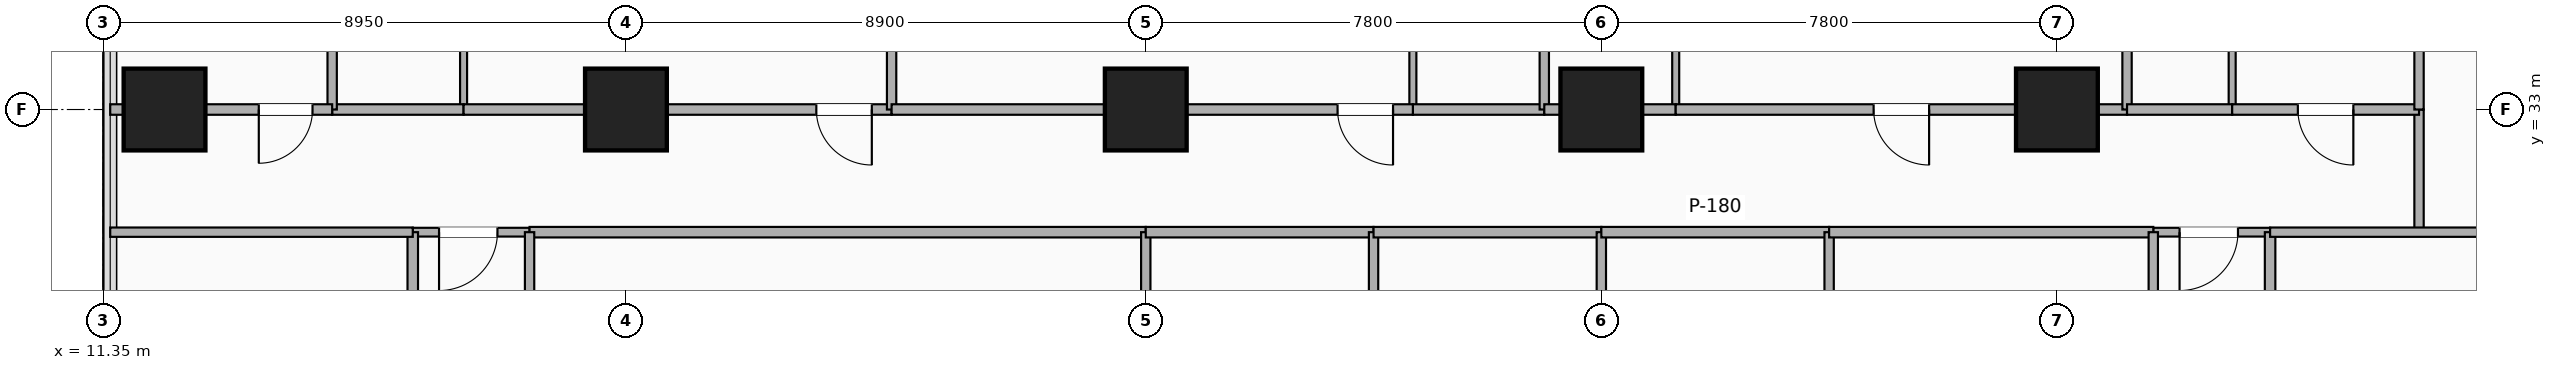
"""IFC4 building model, lengths in metres.
Left out: names, types, materials, properties, quantities, classifications, styles, units other than length and angle.
Written with IfcOpenShell. Run it as: python <this file> out.ifc"""

import sys

from ifc_helpers import new_model, si_unit, direction, frame, frame_2d, origin, origin_2d, place, context, subcontext, project, spatial, rectangle, extrude, element, fill, save


model = new_model("IFC4")
c1 = context("Model", 3, precision=1e-05, world=origin(), true_north=direction((0.0, 1.0)))
c2 = subcontext(c1, "Body", "Model", "MODEL_VIEW")
j1 = project(units=[si_unit("LENGTHUNIT", "METRE"), si_unit("PLANEANGLEUNIT", "RADIAN")], contexts=[c1])
p1 = place(None, origin())
s1 = spatial("IfcSite", under=j1, at=p1, CompositionType="ELEMENT")
p2 = place(p1, origin())
s2 = spatial("IfcBuilding", under=s1, at=p2, CompositionType="ELEMENT")
p3 = place(p2, frame((0.0, 0.0, 50.9)))
s3 = spatial("IfcBuildingStorey", under=s2, at=p3, CompositionType="ELEMENT", Elevation=50.9)
for number, where, z_axis, x_axis in (
    (1, (20.3, 33.0, -0.28), (0.0, 0.0, 1.0), (1.0, 0.0, 0.0)),
    (2, (29.2, 33.0, -0.28), (0.0, 0.0, 1.0), (1.0, 0.0, 0.0)),
    (3, (37.0, 33.0, -0.28), (0.0, 0.0, 1.0), (1.0, 0.0, 0.0)),
    (4, (44.8, 33.0, -0.28), (0.0, 0.0, 1.0), (1.0, 0.0, 0.0)),
    (5, (12.4, 33.0, -0.28), (0.0, 0.0, 1.0), (1.0, 0.0, 0.0)),
):
    element("IfcColumn", number, at=place(p3, frame(where, z_axis=z_axis, x_axis=x_axis)), inside=s3, PredefinedType="COLUMN", context=c2, shape_type="SweptSolid", body=[
        extrude(rectangle(XDim=1.4, YDim=1.4, at=origin_2d()), origin(), (0.0, 0.0, 1.0), 3.5),
    ])
p4 = place(p3, frame((16.65, 30.9, 0.0), z_axis=(0.0, 0.0, 1.0), x_axis=(1.0, 0.0, 0.0)))
e6 = element("IfcWall", 6, at=p4, inside=s3, PredefinedType="PARTITIONING", context=c2, shape_type="SweptSolid", body=[
    extrude(rectangle(XDim=2.0, YDim=0.15, at=frame_2d((1.0, 0.0))), origin(), (0.0, 0.0, 1.0), 3.22),
])
p5 = place(p4, frame((0.45, 0.0, 0.0)))
e7 = element("IfcOpeningElement", 7, at=p5, cuts=e6, PredefinedType="OPENING", context=c2, shape_type="SweptSolid", body=[
    extrude(rectangle(XDim=1.0, YDim=2.15, at=frame_2d((0.5, 1.075))), frame((0.0, 0.085, 0.0), z_axis=(0.0, -1.0, 0.0), x_axis=(1.0, 0.0, 0.0)), (0.0, 0.0, 1.0), 0.17),
])
p6 = place(p3, frame((46.45, 30.9, 0.0), z_axis=(0.0, 0.0, 1.0), x_axis=(1.0, 0.0, 0.0)))
e8 = element("IfcWall", 8, at=p6, inside=s3, PredefinedType="PARTITIONING", context=c2, shape_type="SweptSolid", body=[
    extrude(rectangle(XDim=2.0, YDim=0.15, at=frame_2d((1.0, 0.0))), origin(), (0.0, 0.0, 1.0), 3.22),
])
p7 = place(p6, frame((0.45, 0.0, 0.0)))
e9 = element("IfcOpeningElement", 9, at=p7, cuts=e8, PredefinedType="OPENING", context=c2, shape_type="SweptSolid", body=[
    extrude(rectangle(XDim=1.0, YDim=2.15, at=frame_2d((0.5, 1.075))), frame((0.0, 0.085, 0.0), z_axis=(0.0, -1.0, 0.0), x_axis=(1.0, 0.0, 0.0)), (0.0, 0.0, 1.0), 0.17),
])
p8 = place(p3, frame((51.0, 30.9, 0.0), z_axis=(0.0, 0.0, 1.0), x_axis=(0.0, 1.0, 0.0)))
e10 = element("IfcWall", 10, at=p8, inside=s3, PredefinedType="PARTITIONING", context=c2, shape_type="SweptSolid", body=[
    extrude(rectangle(XDim=2.1, YDim=0.16, at=frame_2d((1.05, 0.0))), origin(), (0.0, 0.0, 1.0), 2.51),
])
p9 = place(p3, frame((18.65, 30.9, 0.0), z_axis=(0.0, 0.0, 1.0), x_axis=(1.0, 0.0, 0.0)))
e11 = element("IfcWall", 11, at=p9, inside=s3, PredefinedType="PARTITIONING", context=c2, shape_type="SweptSolid", body=[
    extrude(rectangle(XDim=10.55, YDim=0.18, at=frame_2d((5.275, 0.0))), origin(), (0.0, 0.0, 1.0), 2.51),
])
p10 = place(p3, frame((18.65, 22.65, 0.0), z_axis=(0.0, 0.0, 1.0), x_axis=(0.0, 1.0, 0.0)))
e12 = element("IfcWall", 12, at=p10, inside=s3, PredefinedType="PARTITIONING", context=c2, shape_type="SweptSolid", body=[
    extrude(rectangle(XDim=8.25, YDim=0.16, at=frame_2d((4.125, 0.0))), origin(), (0.0, 0.0, 1.0), 2.788),
])
p11 = place(p3, frame((29.2, 22.65, 0.0), z_axis=(0.0, 0.0, 1.0), x_axis=(0.0, 1.0, 0.0)))
e13 = element("IfcWall", 13, at=p11, inside=s3, PredefinedType="PARTITIONING", context=c2, shape_type="SweptSolid", body=[
    extrude(rectangle(XDim=8.25, YDim=0.16, at=frame_2d((4.125, 0.0))), origin(), (0.0, 0.0, 1.0), 2.51),
])
p12 = place(p3, frame((29.2, 30.9, 0.0), z_axis=(0.0, 0.0, 1.0), x_axis=(1.0, 0.0, 0.0)))
e14 = element("IfcWall", 14, at=p12, inside=s3, PredefinedType="PARTITIONING", context=c2, shape_type="SweptSolid", body=[
    extrude(rectangle(XDim=3.9, YDim=0.18, at=frame_2d((1.95, 0.0))), origin(), (0.0, 0.0, 1.0), 2.51),
])
p13 = place(p3, frame((33.1, 22.65, 0.0), z_axis=(0.0, 0.0, 1.0), x_axis=(0.0, 1.0, 0.0)))
e15 = element("IfcWall", 15, at=p13, inside=s3, PredefinedType="PARTITIONING", context=c2, shape_type="SweptSolid", body=[
    extrude(rectangle(XDim=8.25, YDim=0.16, at=frame_2d((4.125, 0.0))), origin(), (0.0, 0.0, 1.0), 2.788),
])
p14 = place(p3, frame((33.1, 30.9, 0.0), z_axis=(0.0, 0.0, 1.0), x_axis=(1.0, 0.0, 0.0)))
e16 = element("IfcWall", 16, at=p14, inside=s3, PredefinedType="PARTITIONING", context=c2, shape_type="SweptSolid", body=[
    extrude(rectangle(XDim=3.9, YDim=0.18, at=frame_2d((1.95, 0.0))), origin(), (0.0, 0.0, 1.0), 2.51),
])
p15 = place(p3, frame((37.0, 22.65, 0.0), z_axis=(0.0, 0.0, 1.0), x_axis=(0.0, 1.0, 0.0)))
e17 = element("IfcWall", 17, at=p15, inside=s3, PredefinedType="PARTITIONING", context=c2, shape_type="SweptSolid", body=[
    extrude(rectangle(XDim=8.25, YDim=0.16, at=frame_2d((4.125, 0.0))), origin(), (0.0, 0.0, 1.0), 2.51),
])
p16 = place(p3, frame((37.0, 30.9, 0.0), z_axis=(0.0, 0.0, 1.0), x_axis=(1.0, 0.0, 0.0)))
e18 = element("IfcWall", 18, at=p16, inside=s3, PredefinedType="PARTITIONING", context=c2, shape_type="SweptSolid", body=[
    extrude(rectangle(XDim=3.9, YDim=0.18, at=frame_2d((1.95, 0.0))), origin(), (0.0, 0.0, 1.0), 2.51),
])
p17 = place(p3, frame((40.9, 22.65, 0.0), z_axis=(0.0, 0.0, 1.0), x_axis=(0.0, 1.0, 0.0)))
e19 = element("IfcWall", 19, at=p17, inside=s3, PredefinedType="PARTITIONING", context=c2, shape_type="SweptSolid", body=[
    extrude(rectangle(XDim=8.25, YDim=0.16, at=frame_2d((4.125, 0.0))), origin(), (0.0, 0.0, 1.0), 2.788),
])
p18 = place(p3, frame((40.9, 30.9, 0.0), z_axis=(0.0, 0.0, 1.0), x_axis=(1.0, 0.0, 0.0)))
e20 = element("IfcWall", 20, at=p18, inside=s3, PredefinedType="PARTITIONING", context=c2, shape_type="SweptSolid", body=[
    extrude(rectangle(XDim=5.55, YDim=0.18, at=frame_2d((2.775, 0.0))), origin(), (0.0, 0.0, 1.0), 2.51),
])
p19 = place(p3, frame((46.45, 22.65, 0.0), z_axis=(0.0, 0.0, 1.0), x_axis=(0.0, 1.0, 0.0)))
e21 = element("IfcWall", 21, at=p19, inside=s3, PredefinedType="PARTITIONING", context=c2, shape_type="SweptSolid", body=[
    extrude(rectangle(XDim=8.25, YDim=0.16, at=frame_2d((4.125, 0.0))), origin(), (0.0, 0.0, 1.0), 2.788),
])
p20 = place(p3, frame((17.52, 33.0, 0.0), z_axis=(0.0, 0.0, 1.0), x_axis=(0.0, 1.0, 0.0)))
e22 = element("IfcWall", 22, at=p20, inside=s3, PredefinedType="PARTITIONING", context=c2, shape_type="SweptSolid", body=[
    extrude(rectangle(XDim=2.35, YDim=0.12, at=frame_2d((1.175, 0.0))), origin(), (0.0, 0.0, 1.0), 2.51),
])
p21 = place(p3, frame((15.27, 33.0, 0.0), z_axis=(0.0, 0.0, 1.0), x_axis=(1.0, 0.0, 0.0)))
e23 = element("IfcWall", 23, at=p21, inside=s3, PredefinedType="PARTITIONING", context=c2, shape_type="SweptSolid", body=[
    extrude(rectangle(XDim=2.25, YDim=0.18, at=frame_2d((1.125, 0.0))), origin(), (0.0, 0.0, 1.0), 2.51),
])
p22 = place(p3, frame((17.52, 33.0, 0.0), z_axis=(0.0, 0.0, 1.0), x_axis=(1.0, 0.0, 0.0)))
e24 = element("IfcWall", 24, at=p22, inside=s3, PredefinedType="PARTITIONING", context=c2, shape_type="SweptSolid", body=[
    extrude(rectangle(XDim=7.328, YDim=0.18, at=frame_2d((3.664, 0.0))), origin(), (0.0, 0.0, 1.0), 2.51),
])
p23 = place(p22, frame((6.04, 0.0, 0.0)))
e25 = element("IfcOpeningElement", 25, at=p23, cuts=e24, PredefinedType="OPENING", context=c2, shape_type="SweptSolid", body=[
    extrude(rectangle(XDim=0.95, YDim=2.15, at=frame_2d((0.475, 1.075))), frame((0.0, 0.1, 0.0), z_axis=(0.0, -1.0, 0.0), x_axis=(1.0, 0.0, 0.0)), (0.0, 0.0, 1.0), 0.2),
])
p24 = place(p3, frame((15.27, 33.0, 0.0), z_axis=(0.0, 0.0, 1.0), x_axis=(0.0, 1.0, 0.0)))
e26 = element("IfcWall", 26, at=p24, inside=s3, PredefinedType="PARTITIONING", context=c2, shape_type="SweptSolid", body=[
    extrude(rectangle(XDim=11.58, YDim=0.16, at=frame_2d((5.79, 0.0))), origin(), (0.0, 0.0, 1.0), 2.51),
])
p25 = place(p3, frame((24.848, 33.0, 0.0), z_axis=(0.0, 0.0, 1.0), x_axis=(0.0, 1.0, 0.0)))
e27 = element("IfcWall", 27, at=p25, inside=s3, PredefinedType="PARTITIONING", context=c2, shape_type="SweptSolid", body=[
    extrude(rectangle(XDim=15.38, YDim=0.16, at=frame_2d((7.69, 0.0))), origin(), (0.0, 0.0, 1.0), 2.51),
])
p26 = place(p3, frame((33.773, 33.0, 0.0), z_axis=(0.0, 0.0, 1.0), x_axis=(0.0, 1.0, 0.0)))
e28 = element("IfcWall", 28, at=p26, inside=s3, PredefinedType="PARTITIONING", context=c2, shape_type="SweptSolid", body=[
    extrude(rectangle(XDim=2.35, YDim=0.12, at=frame_2d((1.175, 0.0))), origin(), (0.0, 0.0, 1.0), 2.51),
])
p27 = place(p3, frame((33.773, 33.0, 0.0), z_axis=(0.0, 0.0, 1.0), x_axis=(1.0, 0.0, 0.0)))
e29 = element("IfcWall", 29, at=p27, inside=s3, PredefinedType="PARTITIONING", context=c2, shape_type="SweptSolid", body=[
    extrude(rectangle(XDim=2.25, YDim=0.18, at=frame_2d((1.125, 0.0))), origin(), (0.0, 0.0, 1.0), 2.51),
])
p28 = place(p3, frame((24.848, 33.0, 0.0), z_axis=(0.0, 0.0, 1.0), x_axis=(1.0, 0.0, 0.0)))
e30 = element("IfcWall", 30, at=p28, inside=s3, PredefinedType="PARTITIONING", context=c2, shape_type="SweptSolid", body=[
    extrude(rectangle(XDim=8.925, YDim=0.18, at=frame_2d((4.462, 0.0))), origin(), (0.0, 0.0, 1.0), 2.51),
])
p29 = place(p28, frame((7.635, 0.0, 0.0)))
e31 = element("IfcOpeningElement", 31, at=p29, cuts=e30, PredefinedType="OPENING", context=c2, shape_type="SweptSolid", body=[
    extrude(rectangle(XDim=0.95, YDim=2.15, at=frame_2d((0.475, 1.075))), frame((0.0, 0.1, 0.0), z_axis=(0.0, -1.0, 0.0), x_axis=(1.0, 0.0, 0.0)), (0.0, 0.0, 1.0), 0.2),
])
p30 = place(p3, frame((36.023, 33.0, 0.0), z_axis=(0.0, 0.0, 1.0), x_axis=(0.0, 1.0, 0.0)))
e32 = element("IfcWall", 32, at=p30, inside=s3, PredefinedType="PARTITIONING", context=c2, shape_type="SweptSolid", body=[
    extrude(rectangle(XDim=15.38, YDim=0.16, at=frame_2d((7.69, 0.0))), origin(), (0.0, 0.0, 1.0), 2.51),
])
p31 = place(p3, frame((38.273, 33.0, 0.0), z_axis=(0.0, 0.0, 1.0), x_axis=(0.0, 1.0, 0.0)))
e33 = element("IfcWall", 33, at=p31, inside=s3, PredefinedType="PARTITIONING", context=c2, shape_type="SweptSolid", body=[
    extrude(rectangle(XDim=2.35, YDim=0.12, at=frame_2d((1.175, 0.0))), origin(), (0.0, 0.0, 1.0), 2.51),
])
p32 = place(p3, frame((36.023, 33.0, 0.0), z_axis=(0.0, 0.0, 1.0), x_axis=(1.0, 0.0, 0.0)))
e34 = element("IfcWall", 34, at=p32, inside=s3, PredefinedType="PARTITIONING", context=c2, shape_type="SweptSolid", body=[
    extrude(rectangle(XDim=2.25, YDim=0.18, at=frame_2d((1.125, 0.0))), origin(), (0.0, 0.0, 1.0), 2.51),
])
p33 = place(p3, frame((38.273, 33.0, 0.0), z_axis=(0.0, 0.0, 1.0), x_axis=(1.0, 0.0, 0.0)))
e35 = element("IfcWall", 35, at=p33, inside=s3, PredefinedType="PARTITIONING", context=c2, shape_type="SweptSolid", body=[
    extrude(rectangle(XDim=7.728, YDim=0.18, at=frame_2d((3.864, 0.0))), origin(), (0.0, 0.0, 1.0), 2.51),
])
p34 = place(p33, frame((3.389, 0.0, 0.0)))
e36 = element("IfcOpeningElement", 36, at=p34, cuts=e35, PredefinedType="OPENING", context=c2, shape_type="SweptSolid", body=[
    extrude(rectangle(XDim=0.95, YDim=2.15, at=frame_2d((0.475, 1.075))), frame((0.0, 0.1, 0.0), z_axis=(0.0, -1.0, 0.0), x_axis=(1.0, 0.0, 0.0)), (0.0, 0.0, 1.0), 0.2),
])
p35 = place(p3, frame((46.001, 33.0, 0.0), z_axis=(0.0, 0.0, 1.0), x_axis=(0.0, 1.0, 0.0)))
e37 = element("IfcWall", 37, at=p35, inside=s3, PredefinedType="PARTITIONING", context=c2, shape_type="SweptSolid", body=[
    extrude(rectangle(XDim=15.38, YDim=0.16, at=frame_2d((7.69, 0.0))), origin(), (0.0, 0.0, 1.0), 2.51),
])
p36 = place(p3, frame((47.801, 33.0, 0.0), z_axis=(0.0, 0.0, 1.0), x_axis=(0.0, 1.0, 0.0)))
e38 = element("IfcWall", 38, at=p36, inside=s3, PredefinedType="PARTITIONING", context=c2, shape_type="SweptSolid", body=[
    extrude(rectangle(XDim=2.35, YDim=0.12, at=frame_2d((1.175, 0.0))), origin(), (0.0, 0.0, 1.0), 2.51),
])
p37 = place(p3, frame((46.001, 33.0, 0.0), z_axis=(0.0, 0.0, 1.0), x_axis=(1.0, 0.0, 0.0)))
e39 = element("IfcWall", 39, at=p37, inside=s3, PredefinedType="PARTITIONING", context=c2, shape_type="SweptSolid", body=[
    extrude(rectangle(XDim=1.8, YDim=0.18, at=frame_2d((0.9, 0.0))), origin(), (0.0, 0.0, 1.0), 2.51),
])
p38 = place(p3, frame((47.801, 33.0, 0.0), z_axis=(0.0, 0.0, 1.0), x_axis=(1.0, 0.0, 0.0)))
e40 = element("IfcWall", 40, at=p38, inside=s3, PredefinedType="PARTITIONING", context=c2, shape_type="SweptSolid", body=[
    extrude(rectangle(XDim=3.199, YDim=0.18, at=frame_2d((1.6, 0.0))), origin(), (0.0, 0.0, 1.0), 2.51),
])
p39 = place(p38, frame((1.125, 0.0, 0.0)))
e41 = element("IfcOpeningElement", 41, at=p39, cuts=e40, PredefinedType="OPENING", context=c2, shape_type="SweptSolid", body=[
    extrude(rectangle(XDim=0.95, YDim=2.15, at=frame_2d((0.475, 1.075))), frame((0.0, 0.1, 0.0), z_axis=(0.0, -1.0, 0.0), x_axis=(1.0, 0.0, 0.0)), (0.0, 0.0, 1.0), 0.2),
])
p40 = place(p3, frame((51.0, 33.0, 0.0), z_axis=(0.0, 0.0, 1.0), x_axis=(0.0, 1.0, 0.0)))
e42 = element("IfcWall", 42, at=p40, inside=s3, PredefinedType="PARTITIONING", context=c2, shape_type="SweptSolid", body=[
    extrude(rectangle(XDim=15.38, YDim=0.16, at=frame_2d((7.69, 0.0))), origin(), (0.0, 0.0, 1.0), 2.51),
])
p41 = place(p3, frame((16.65, 24.1, 0.0), z_axis=(0.0, 0.0, 1.0), x_axis=(0.0, 1.0, 0.0)))
e43 = element("IfcWall", 43, at=p41, inside=s3, PredefinedType="PARTITIONING", context=c2, shape_type="SweptSolid", body=[
    extrude(rectangle(XDim=6.8, YDim=0.18, at=frame_2d((3.4, 0.0))), origin(), (0.0, 0.0, 1.0), 2.788),
])
p42 = place(p41, frame((2.925, 0.0, 0.0)))
e44 = element("IfcOpeningElement", 44, at=p42, cuts=e43, PredefinedType="OPENING", context=c2, shape_type="SweptSolid", body=[
    extrude(rectangle(XDim=0.95, YDim=2.15, at=frame_2d((0.475, 1.075))), frame((0.0, 0.1, 0.0), z_axis=(0.0, -1.0, 0.0), x_axis=(1.0, 0.0, 0.0)), (0.0, 0.0, 1.0), 0.2),
])
p43 = place(p3, frame((11.47, 30.9, 0.0), z_axis=(0.0, 0.0, 1.0), x_axis=(1.0, 0.0, 0.0)))
e45 = element("IfcWall", 45, at=p43, inside=s3, PredefinedType="PARTITIONING", context=c2, shape_type="SweptSolid", body=[
    extrude(rectangle(XDim=5.18, YDim=0.16, at=frame_2d((2.59, 0.0))), origin(), (0.0, 0.0, 1.0), 2.583),
])
p44 = place(p3, frame((48.45, 26.55, 0.0), z_axis=(0.0, 0.0, 1.0), x_axis=(0.0, 1.0, 0.0)))
e46 = element("IfcWall", 46, at=p44, inside=s3, PredefinedType="PARTITIONING", context=c2, shape_type="SweptSolid", body=[
    extrude(rectangle(XDim=4.35, YDim=0.18, at=frame_2d((2.175, 0.0))), origin(), (0.0, 0.0, 1.0), 2.788),
])
p45 = place(p44, frame((2.65, 0.0, 0.0), z_axis=(0.0, 0.0, 1.0), x_axis=(-1.0, 0.0, 0.0)))
e47 = element("IfcOpeningElement", 47, at=p45, cuts=e46, PredefinedType="OPENING", context=c2, shape_type="SweptSolid", body=[
    extrude(rectangle(XDim=0.95, YDim=2.15, at=frame_2d((0.475, 1.075))), frame((0.0, 0.1, 0.0), z_axis=(0.0, -1.0, 0.0), x_axis=(1.0, 0.0, 0.0)), (0.0, 0.0, 1.0), 0.2),
])
p46 = place(p3, frame((48.45, 30.9, 0.0), z_axis=(0.0, 0.0, 1.0), x_axis=(1.0, 0.0, 0.0)))
e48 = element("IfcWall", 48, at=p46, inside=s3, PredefinedType="PARTITIONING", context=c2, shape_type="SweptSolid", body=[
    extrude(rectangle(XDim=13.23, YDim=0.16, at=frame_2d((6.615, 0.0))), origin(), (0.0, 0.0, 1.0), 2.583),
])
p47 = place(p3, frame((11.47, 33.0, 0.0), z_axis=(0.0, 0.0, 1.0), x_axis=(1.0, 0.0, 0.0)))
e49 = element("IfcWall", 49, at=p47, inside=s3, PredefinedType="PARTITIONING", context=c2, shape_type="SweptSolid", body=[
    extrude(rectangle(XDim=3.8, YDim=0.18, at=frame_2d((1.9, 0.0))), origin(), (0.0, 0.0, 1.0), 2.51),
])
p48 = place(p47, frame((2.544, 0.0, 0.0)))
e50 = element("IfcOpeningElement", 50, at=p48, cuts=e49, PredefinedType="OPENING", context=c2, shape_type="SweptSolid", body=[
    extrude(rectangle(XDim=0.92, YDim=2.08, at=frame_2d((0.46, 1.04))), frame((0.0, 0.1, 0.0), z_axis=(0.0, -1.0, 0.0), x_axis=(1.0, 0.0, 0.0)), (0.0, 0.0, 1.0), 0.2),
])
p49 = place(p5, origin())
e51 = element("IfcDoor", 51, at=p49, inside=s3, OperationType="SINGLE_SWING_LEFT", PredefinedType="DOOR", context=c2, shape_type="SweptSolid", body=[
    extrude(rectangle(XDim=1.0, YDim=2.15, at=frame_2d((0.5, 1.075))), frame((0.0, 0.025, 0.0), z_axis=(0.0, -1.0, 0.0), x_axis=(1.0, 0.0, 0.0)), (0.0, 0.0, 1.0), 0.05),
])
fill(e7, e51)
p50 = place(p7, origin())
e52 = element("IfcDoor", 52, at=p50, inside=s3, OperationType="SINGLE_SWING_LEFT", PredefinedType="DOOR", context=c2, shape_type="SweptSolid", body=[
    extrude(rectangle(XDim=1.0, YDim=2.15, at=frame_2d((0.5, 1.075))), frame((0.0, 0.025, 0.0), z_axis=(0.0, -1.0, 0.0), x_axis=(1.0, 0.0, 0.0)), (0.0, 0.0, 1.0), 0.05),
])
fill(e9, e52)
p51 = place(p23, origin())
e53 = element("IfcDoor", 53, at=p51, inside=s3, OperationType="SINGLE_SWING_RIGHT", PredefinedType="DOOR", context=c2, shape_type="SweptSolid", body=[
    extrude(rectangle(XDim=0.95, YDim=2.15, at=frame_2d((0.475, 1.075))), frame((0.0, 0.025, 0.0), z_axis=(0.0, -1.0, 0.0), x_axis=(1.0, 0.0, 0.0)), (0.0, 0.0, 1.0), 0.05),
])
fill(e25, e53)
p52 = place(p29, origin())
e54 = element("IfcDoor", 54, at=p52, inside=s3, OperationType="SINGLE_SWING_RIGHT", PredefinedType="DOOR", context=c2, shape_type="SweptSolid", body=[
    extrude(rectangle(XDim=0.95, YDim=2.15, at=frame_2d((0.475, 1.075))), frame((0.0, 0.025, 0.0), z_axis=(0.0, -1.0, 0.0), x_axis=(1.0, 0.0, 0.0)), (0.0, 0.0, 1.0), 0.05),
])
fill(e31, e54)
p53 = place(p34, origin())
e55 = element("IfcDoor", 55, at=p53, inside=s3, OperationType="SINGLE_SWING_RIGHT", PredefinedType="DOOR", context=c2, shape_type="SweptSolid", body=[
    extrude(rectangle(XDim=0.95, YDim=2.15, at=frame_2d((0.475, 1.075))), frame((0.0, 0.025, 0.0), z_axis=(0.0, -1.0, 0.0), x_axis=(1.0, 0.0, 0.0)), (0.0, 0.0, 1.0), 0.05),
])
fill(e36, e55)
p54 = place(p39, origin())
e56 = element("IfcDoor", 56, at=p54, inside=s3, OperationType="SINGLE_SWING_RIGHT", PredefinedType="DOOR", context=c2, shape_type="SweptSolid", body=[
    extrude(rectangle(XDim=0.95, YDim=2.15, at=frame_2d((0.475, 1.075))), frame((0.0, 0.025, 0.0), z_axis=(0.0, -1.0, 0.0), x_axis=(1.0, 0.0, 0.0)), (0.0, 0.0, 1.0), 0.05),
])
fill(e41, e56)
p55 = place(p48, origin())
e57 = element("IfcDoor", 57, at=p55, inside=s3, OperationType="SINGLE_SWING_LEFT", PredefinedType="DOOR", context=c2, shape_type="SweptSolid", body=[
    extrude(rectangle(XDim=0.92, YDim=2.08, at=frame_2d((0.46, 1.04))), frame((0.0, 0.025, 0.0), z_axis=(0.0, -1.0, 0.0), x_axis=(1.0, 0.0, 0.0)), (0.0, 0.0, 1.0), 0.05),
])
fill(e50, e57)
save(model, sys.argv[1])
